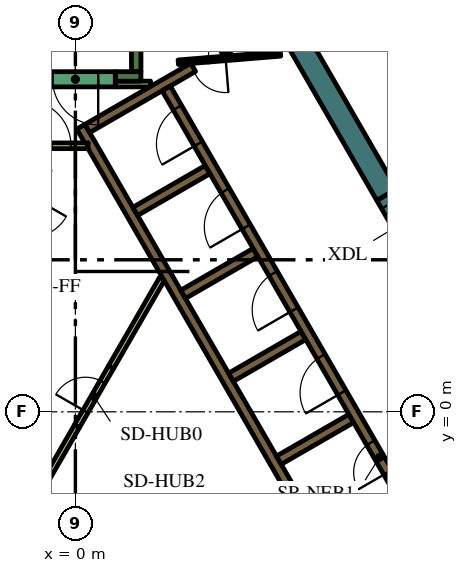
"""IFC4 building model, lengths in metres.
Left out: names, types, materials, properties, quantities, classifications, styles, units other than length and angle.
Written with IfcOpenShell. Run it as: python <this file> out.ifc"""

import sys

from ifc_helpers import new_model, si_unit, direction, frame, frame_2d, origin, place, context, subcontext, project, spatial, polyline, rectangle, outline, extrude, element, fill, save


model = new_model("IFC4")
c1 = context("Model", 3, precision=1e-05, world=origin(), true_north=direction((0.0, 1.0)))
c2 = subcontext(c1, "Body", "Model", "MODEL_VIEW")
j1 = project(units=[si_unit("LENGTHUNIT", "METRE"), si_unit("PLANEANGLEUNIT", "RADIAN")], contexts=[c1])
p1 = place(None, origin())
s1 = spatial("IfcSite", under=j1, at=p1, CompositionType="ELEMENT")
p2 = place(p1, origin())
s2 = spatial("IfcBuilding", under=s1, at=p2, CompositionType="ELEMENT")
p3 = place(p2, frame((0.0, 0.0, 292.2)))
s3 = spatial("IfcBuildingStorey", under=s2, at=p3, CompositionType="ELEMENT", Elevation=292.2)
p4 = place(p3, frame((1.989, 16.456, 0.0), z_axis=(0.0, 0.0, 1.0), x_axis=(0.49999102663, -0.8660305845, 0.0)))
e1 = element("IfcWall", 1, at=p4, inside=s3, PredefinedType="SOLIDWALL", context=c2, shape_type="SweptSolid", body=[
    extrude(rectangle(XDim=12.406, YDim=0.6, at=frame_2d((6.203, 0.0))), origin(), (0.0, 0.0, 1.0), 4.2),
])
p5 = place(p3, frame((1.6, 8.95, 0.0), z_axis=(0.0, 0.0, 1.0), x_axis=(0.0, 1.0, 0.0)))
e2 = element("IfcWall", 2, at=p5, inside=s3, PredefinedType="SOLIDWALL", context=c2, shape_type="SweptSolid", body=[
    extrude(rectangle(XDim=6.8, YDim=0.25, at=frame_2d((3.4, 0.0))), origin(), (0.0, 0.0, 1.0), 4.2),
])
p6 = place(p3, frame((1.05, 8.825, 0.0), z_axis=(0.0, 0.0, 1.0), x_axis=(1.0, 0.0, 0.0)))
e3 = element("IfcWall", 3, at=p6, inside=s3, PredefinedType="SOLIDWALL", context=c2, shape_type="SweptSolid", body=[
    extrude(rectangle(XDim=0.675, YDim=0.25, at=frame_2d((0.337, 0.0))), origin(), (0.0, 0.0, 1.0), 4.2),
])
p7 = place(p3, origin())
e4 = element("IfcWall", 4, at=p7, inside=s3, PredefinedType="SOLIDWALL", context=c2, shape_type="SweptSolid", body=[
    extrude(outline(polyline([(0.332, 6.925), (0.335, 6.925), (0.335, 6.925), (0.335, 6.925), (0.335, 7.075), (0.335, 7.075), (0.335, 7.075), (0.245, 7.075), (0.035, 7.439), (0.252, 7.564), (0.377, 7.348), (1.512, 5.382), (1.637, 5.165), (2.221, 4.153), (2.771, 3.199), (2.896, 2.983), (3.138, 2.564), (4.031, 1.017), (4.156, 0.801), (5.292, -1.165), (5.417, -1.382), (6.073, -2.519), (6.552, -3.348), (6.677, -3.564), (6.46, -3.689), (0.332, 6.925)])), origin(), (0.0, 0.0, 1.0), 4.2),
])
p8 = place(p3, frame((3.1, 9.064, 0.0), z_axis=(0.0, 0.0, 1.0), x_axis=(-0.866030133475, -0.499991807846, 0.0)))
e5 = element("IfcWall", 5, at=p8, inside=s3, PredefinedType="SOLIDWALL", context=c2, shape_type="SweptSolid", body=[
    extrude(rectangle(XDim=3.217, YDim=0.25, at=frame_2d((1.608, 0.0))), origin(), (0.0, 0.0, 1.0), 4.2),
])
p9 = place(p3, frame((1.574, 5.274, 0.0), z_axis=(0.0, 0.0, 1.0), x_axis=(0.866028486751, 0.499994660107, 0.0)))
e6 = element("IfcWall", 6, at=p9, inside=s3, PredefinedType="SOLIDWALL", context=c2, shape_type="SweptSolid", body=[
    extrude(rectangle(XDim=2.2, YDim=0.25, at=frame_2d((1.1, 0.0))), origin(), (0.0, 0.0, 1.0), 4.2),
])
for number, where, z_axis, x_axis in (
    (7, (2.834, 3.091, 0.0), (0.0, 0.0, 1.0), (0.866, 0.5, 0.0)),
    (8, (4.094, 0.909, 0.0), (0.0, 0.0, 1.0), (0.866, 0.5, 0.0)),
    (9, (5.354, -1.274, 0.0), (0.0, 0.0, 1.0), (0.866, 0.5, 0.0)),
):
    element("IfcWall", number, at=place(p3, frame(where, z_axis=z_axis, x_axis=x_axis)), inside=s3, PredefinedType="SOLIDWALL", context=c2, shape_type="SweptSolid", body=[
        extrude(rectangle(XDim=2.2, YDim=0.25, at=frame_2d((1.1, 0.0))), origin(), (0.0, 0.0, 1.0), 4.2),
    ])
p10 = place(p3, frame((11.507, -0.631, 0.0), z_axis=(0.0, 0.0, 1.0), x_axis=(-0.866011447264, -0.500024172624, 0.0)))
e10 = element("IfcWall", 10, at=p10, inside=s3, PredefinedType="SOLIDWALL", context=c2, shape_type="SweptSolid", body=[
    extrude(rectangle(XDim=5.65, YDim=0.25, at=frame_2d((2.825, 0.0))), origin(), (0.0, 0.0, 1.0), 4.2),
])
p11 = place(p3, frame((3.83, 9.486, 0.0), z_axis=(0.0, 0.0, 1.0), x_axis=(0.865986202621, 0.500067892261, 0.0)))
e11 = element("IfcWall", 11, at=p11, inside=s3, PredefinedType="SOLIDWALL", context=c2, shape_type="SweptSolid", body=[
    extrude(rectangle(XDim=1.591, YDim=0.25, at=frame_2d((0.795, 0.0))), origin(), (0.0, 0.0, 1.0), 4.2),
])
for number, where, z_axis, x_axis in (
    (12, (0.941, 1.179, 0.0), (0.0, 0.0, 1.0), (0.5, 0.866, 0.0)),
    (13, (-1.295, -2.693, 0.0), (0.0, 0.0, 1.0), (0.5, 0.866, 0.0)),
):
    element("IfcWall", number, at=place(p3, frame(where, z_axis=z_axis, x_axis=x_axis)), inside=s3, PredefinedType="PARTITIONING", context=c2, shape_type="SweptSolid", body=[
        extrude(rectangle(XDim=2.672, YDim=0.15, at=frame_2d((1.336, 0.0))), origin(), (0.0, 0.0, 1.0), 3.55),
    ])
p12 = place(p3, frame((1.05, 8.625, 0.0), z_axis=(0.0, 0.0, 1.0), x_axis=(1.0, 0.0, 0.0)))
e14 = element("IfcWall", 14, at=p12, inside=s3, PredefinedType="PARTITIONING", context=c2, shape_type="SweptSolid", body=[
    extrude(rectangle(XDim=0.929, YDim=0.15, at=frame_2d((0.464, 0.0))), origin(), (0.0, 0.0, 1.0), 3.55),
])
p13 = place(p3, frame((8.565, -2.185, 0.0), z_axis=(0.0, 0.0, 1.0), x_axis=(-0.499997954832, 0.866026584559, 0.0)))
e15 = element("IfcWall", 15, at=p13, inside=s3, PredefinedType="SOLIDWALL", context=c2, shape_type="SweptSolid", body=[
    extrude(rectangle(XDim=12.35, YDim=0.25, at=frame_2d((6.175, 0.0))), origin(), (0.0, 0.0, 1.0), 4.2),
])
p14 = place(p13, frame((0.685, 0.0, 0.0)))
e16 = element("IfcOpeningElement", 16, at=p14, cuts=e15, PredefinedType="OPENING", context=c2, shape_type="SweptSolid", body=[
    extrude(rectangle(XDim=0.9, YDim=2.1, at=frame_2d((0.45, 1.05))), frame((0.0, 0.135, 0.0), z_axis=(0.0, -1.0, 0.0), x_axis=(1.0, 0.0, 0.0)), (0.0, 0.0, 1.0), 0.27),
])
p15 = place(p13, frame((3.105, 0.0, 0.0)))
e17 = element("IfcOpeningElement", 17, at=p15, cuts=e15, PredefinedType="OPENING", context=c2, shape_type="SweptSolid", body=[
    extrude(rectangle(XDim=1.1, YDim=2.1, at=frame_2d((0.55, 1.05))), frame((0.0, 0.135, 0.0), z_axis=(0.0, -1.0, 0.0), x_axis=(1.0, 0.0, 0.0)), (0.0, 0.0, 1.0), 0.27),
])
p16 = place(p13, frame((5.625, 0.0, 0.0)))
e18 = element("IfcOpeningElement", 18, at=p16, cuts=e15, PredefinedType="OPENING", context=c2, shape_type="SweptSolid", body=[
    extrude(rectangle(XDim=1.1, YDim=2.1, at=frame_2d((0.55, 1.05))), frame((0.0, 0.135, 0.0), z_axis=(0.0, -1.0, 0.0), x_axis=(1.0, 0.0, 0.0)), (0.0, 0.0, 1.0), 0.27),
])
p17 = place(p13, frame((8.145, 0.0, 0.0)))
e19 = element("IfcOpeningElement", 19, at=p17, cuts=e15, PredefinedType="OPENING", context=c2, shape_type="SweptSolid", body=[
    extrude(rectangle(XDim=1.1, YDim=2.1, at=frame_2d((0.55, 1.05))), frame((0.0, 0.135, 0.0), z_axis=(0.0, -1.0, 0.0), x_axis=(1.0, 0.0, 0.0)), (0.0, 0.0, 1.0), 0.27),
])
p18 = place(p13, frame((10.665, 0.0, 0.0)))
e20 = element("IfcOpeningElement", 20, at=p18, cuts=e15, PredefinedType="OPENING", context=c2, shape_type="SweptSolid", body=[
    extrude(rectangle(XDim=1.1, YDim=2.1, at=frame_2d((0.55, 1.05))), frame((0.0, 0.135, 0.0), z_axis=(0.0, -1.0, 0.0), x_axis=(1.0, 0.0, 0.0)), (0.0, 0.0, 1.0), 0.27),
])
p19 = place(p3, frame((1.05, 8.75, 0.0), z_axis=(0.0, 0.0, 1.0), x_axis=(-1.0, 0.0, 0.0)))
e21 = element("IfcWall", 21, at=p19, inside=s3, PredefinedType="SOLIDWALL", context=c2, shape_type="SweptSolid", body=[
    extrude(rectangle(XDim=2.1, YDim=0.4, at=frame_2d((1.05, 0.0))), origin(), (0.0, 0.0, 1.0), 4.2),
])
p20 = place(p19, frame((0.45, 0.0, 0.0)))
e22 = element("IfcOpeningElement", 22, at=p20, cuts=e21, PredefinedType="OPENING", context=c2, shape_type="SweptSolid", body=[
    extrude(rectangle(XDim=1.2, YDim=2.1, at=frame_2d((0.6, 1.05))), frame((0.0, 0.21, 0.0), z_axis=(0.0, -1.0, 0.0), x_axis=(1.0, 0.0, 0.0)), (0.0, 0.0, 1.0), 0.42),
])
p21 = place(p3, frame((5.398, 9.419, 0.0), z_axis=(0.0, 0.0, 1.0), x_axis=(-0.996653416376, -0.081743303248, 0.0)))
e23 = element("IfcWall", 23, at=p21, inside=s3, PredefinedType="PARTITIONING", context=c2, shape_type="SweptSolid", body=[
    extrude(rectangle(XDim=2.7, YDim=0.12, at=frame_2d((1.35, 0.0))), origin(), (0.0, 0.0, 1.0), 3.55),
])
p22 = place(p21, frame((1.45, 0.0, 0.0)))
e24 = element("IfcOpeningElement", 24, at=p22, cuts=e23, PredefinedType="OPENING", context=c2, shape_type="SweptSolid", body=[
    extrude(rectangle(XDim=0.9, YDim=2.1, at=frame_2d((0.45, 1.05))), frame((0.0, 0.07, 0.0), z_axis=(0.0, -1.0, 0.0), x_axis=(1.0, 0.0, 0.0)), (0.0, 0.0, 1.0), 0.14),
])
p23 = place(p3, frame((-1.765, 7.0, 0.0), z_axis=(0.0, 0.0, 1.0), x_axis=(1.0, 0.0, 0.0)))
e25 = element("IfcWall", 25, at=p23, inside=s3, PredefinedType="PARTITIONING", context=c2, shape_type="SweptSolid", body=[
    extrude(rectangle(XDim=2.1, YDim=0.15, at=frame_2d((1.05, 0.0))), origin(), (0.0, 0.0, 1.0), 3.55),
])
p24 = place(p23, frame((0.45, 0.0, 0.0)))
e26 = element("IfcOpeningElement", 26, at=p24, cuts=e25, PredefinedType="OPENING", context=c2, shape_type="SweptSolid", body=[
    extrude(rectangle(XDim=1.2, YDim=2.1, at=frame_2d((0.6, 1.05))), frame((0.0, 0.085, 0.0), z_axis=(0.0, -1.0, 0.0), x_axis=(1.0, 0.0, 0.0)), (0.0, 0.0, 1.0), 0.17),
])
p25 = place(p3, frame((8.192, 5.711, 0.0), z_axis=(0.0, 0.0, 1.0), x_axis=(0.500062241894, -0.865989465428, 0.0)))
e27 = element("IfcWall", 27, at=p25, inside=s3, PredefinedType="SOLIDWALL", context=c2, shape_type="SweptSolid", body=[
    extrude(rectangle(XDim=1.7, YDim=0.6, at=frame_2d((0.85, 0.0))), origin(), (0.0, 0.0, 1.0), 4.2),
])
p26 = place(p25, frame((0.25, 0.0, 0.0)))
e28 = element("IfcOpeningElement", 28, at=p26, cuts=e27, PredefinedType="OPENING", context=c2, shape_type="SweptSolid", body=[
    extrude(rectangle(XDim=1.2, YDim=2.1, at=frame_2d((0.6, 1.05))), frame((0.0, 0.31, 0.0), z_axis=(0.0, -1.0, 0.0), x_axis=(1.0, 0.0, 0.0)), (0.0, 0.0, 1.0), 0.62),
])
p27 = place(p3, frame((0.041, -0.379, 0.0), z_axis=(0.0, 0.0, 1.0), x_axis=(0.499961193289, 0.866047807691, 0.0)))
e29 = element("IfcWall", 29, at=p27, inside=s3, PredefinedType="PARTITIONING", context=c2, shape_type="SweptSolid", body=[
    extrude(rectangle(XDim=1.8, YDim=0.15, at=frame_2d((0.9, 0.0))), origin(), (0.0, 0.0, 1.0), 3.55),
])
p28 = place(p27, frame((0.45, 0.0, 0.0)))
e30 = element("IfcOpeningElement", 30, at=p28, cuts=e29, PredefinedType="OPENING", context=c2, shape_type="SweptSolid", body=[
    extrude(rectangle(XDim=0.9, YDim=2.1, at=frame_2d((0.45, 1.05))), frame((0.0, 0.085, 0.0), z_axis=(0.0, -1.0, 0.0), x_axis=(1.0, 0.0, 0.0)), (0.0, 0.0, 1.0), 0.17),
])
p29 = place(p3, frame((13.436, 0.829, 0.0), z_axis=(0.0, 0.0, 1.0), x_axis=(-0.49999894854, 0.866026010844, 0.0)))
e31 = element("IfcWall", 31, at=p29, inside=s3, PredefinedType="PARTITIONING", context=c2, shape_type="SweptSolid", body=[
    extrude(rectangle(XDim=12.0, YDim=0.2, at=frame_2d((6.0, 0.0))), origin(), (0.0, 0.0, 1.0), 3.55),
])
p30 = place(p29, frame((5.5, 0.0, 0.0)))
e32 = element("IfcOpeningElement", 32, at=p30, cuts=e31, PredefinedType="OPENING", context=c2, shape_type="SweptSolid", body=[
    extrude(rectangle(XDim=1.0, YDim=2.1, at=frame_2d((0.5, 1.05))), frame((0.0, 0.11, 0.0), z_axis=(0.0, -1.0, 0.0), x_axis=(1.0, 0.0, 0.0)), (0.0, 0.0, 1.0), 0.22),
])
p31 = place(p14, origin())
e33 = element("IfcDoor", 33, at=p31, inside=s3, OperationType="SINGLE_SWING_LEFT", PredefinedType="DOOR", context=c2, shape_type="SweptSolid", body=[
    extrude(rectangle(XDim=0.9, YDim=2.1, at=frame_2d((0.45, 1.05))), frame((0.0, 0.025, 0.0), z_axis=(0.0, -1.0, 0.0), x_axis=(1.0, 0.0, 0.0)), (0.0, 0.0, 1.0), 0.05),
])
fill(e16, e33)
p32 = place(p15, origin())
e34 = element("IfcDoor", 34, at=p32, inside=s3, OperationType="DOUBLE_DOOR_SLIDING", PredefinedType="DOOR", context=c2, shape_type="SweptSolid", body=[
    extrude(rectangle(XDim=1.1, YDim=2.1, at=frame_2d((0.55, 1.05))), frame((0.0, 0.025, 0.0), z_axis=(0.0, -1.0, 0.0), x_axis=(1.0, 0.0, 0.0)), (0.0, 0.0, 1.0), 0.05),
])
fill(e17, e34)
p33 = place(p16, origin())
e35 = element("IfcDoor", 35, at=p33, inside=s3, OperationType="DOUBLE_DOOR_SLIDING", PredefinedType="DOOR", context=c2, shape_type="SweptSolid", body=[
    extrude(rectangle(XDim=1.1, YDim=2.1, at=frame_2d((0.55, 1.05))), frame((0.0, 0.025, 0.0), z_axis=(0.0, -1.0, 0.0), x_axis=(1.0, 0.0, 0.0)), (0.0, 0.0, 1.0), 0.05),
])
fill(e18, e35)
p34 = place(p17, origin())
e36 = element("IfcDoor", 36, at=p34, inside=s3, OperationType="DOUBLE_DOOR_SLIDING", PredefinedType="DOOR", context=c2, shape_type="SweptSolid", body=[
    extrude(rectangle(XDim=1.1, YDim=2.1, at=frame_2d((0.55, 1.05))), frame((0.0, 0.025, 0.0), z_axis=(0.0, -1.0, 0.0), x_axis=(1.0, 0.0, 0.0)), (0.0, 0.0, 1.0), 0.05),
])
fill(e19, e36)
p35 = place(p18, origin())
e37 = element("IfcDoor", 37, at=p35, inside=s3, OperationType="DOUBLE_DOOR_SLIDING", PredefinedType="DOOR", context=c2, shape_type="SweptSolid", body=[
    extrude(rectangle(XDim=1.1, YDim=2.1, at=frame_2d((0.55, 1.05))), frame((0.0, 0.025, 0.0), z_axis=(0.0, -1.0, 0.0), x_axis=(1.0, 0.0, 0.0)), (0.0, 0.0, 1.0), 0.05),
])
fill(e20, e37)
p36 = place(p20, origin())
e38 = element("IfcDoor", 38, at=p36, inside=s3, OperationType="SINGLE_SWING_LEFT", PredefinedType="DOOR", context=c2, shape_type="SweptSolid", body=[
    extrude(rectangle(XDim=1.2, YDim=2.1, at=frame_2d((0.6, 1.05))), frame((0.0, 0.025, 0.0), z_axis=(0.0, -1.0, 0.0), x_axis=(1.0, 0.0, 0.0)), (0.0, 0.0, 1.0), 0.05),
])
fill(e22, e38)
p37 = place(p22, origin())
e39 = element("IfcDoor", 39, at=p37, inside=s3, OperationType="SINGLE_SWING_LEFT", PredefinedType="DOOR", context=c2, shape_type="SweptSolid", body=[
    extrude(rectangle(XDim=0.9, YDim=2.1, at=frame_2d((0.45, 1.05))), frame((0.0, 0.025, 0.0), z_axis=(0.0, -1.0, 0.0), x_axis=(1.0, 0.0, 0.0)), (0.0, 0.0, 1.0), 0.05),
])
fill(e24, e39)
p38 = place(p24, origin())
e40 = element("IfcDoor", 40, at=p38, inside=s3, OperationType="SINGLE_SWING_LEFT", PredefinedType="DOOR", context=c2, shape_type="SweptSolid", body=[
    extrude(rectangle(XDim=1.2, YDim=2.1, at=frame_2d((0.6, 1.05))), frame((0.0, 0.025, 0.0), z_axis=(0.0, -1.0, 0.0), x_axis=(1.0, 0.0, 0.0)), (0.0, 0.0, 1.0), 0.05),
])
fill(e26, e40)
p39 = place(p28, origin())
e41 = element("IfcDoor", 41, at=p39, inside=s3, OperationType="SINGLE_SWING_LEFT", PredefinedType="DOOR", context=c2, shape_type="SweptSolid", body=[
    extrude(rectangle(XDim=0.9, YDim=2.1, at=frame_2d((0.45, 1.05))), frame((0.0, 0.025, 0.0), z_axis=(0.0, -1.0, 0.0), x_axis=(1.0, 0.0, 0.0)), (0.0, 0.0, 1.0), 0.05),
])
fill(e30, e41)
save(model, sys.argv[1])
